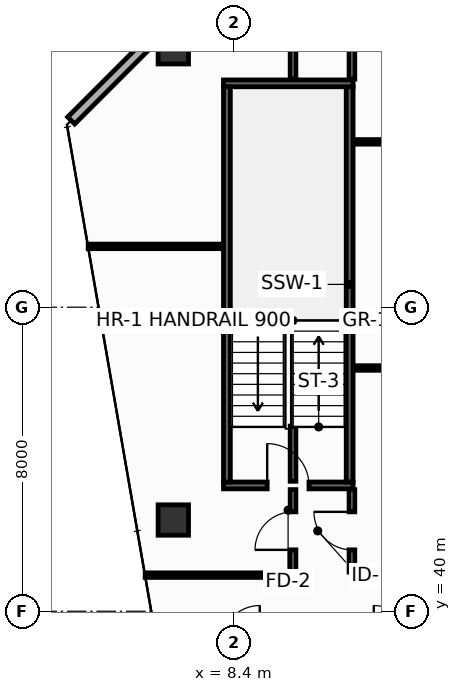
"""IFC4 building model, lengths in metres.
Left out: names, types, materials, properties, quantities, classifications, styles, units other than length and angle.
Written with IfcOpenShell. Run it as: python <this file> out.ifc"""

import sys

from ifc_helpers import new_model, si_unit, direction, frame, frame_2d, origin, origin_2d, place, context, subcontext, project, spatial, rectangle, hollow_rectangle, extrude, element, fill, save


model = new_model("IFC4")
c1 = context("Model", 3, precision=1e-05, world=origin(), true_north=direction((0.0, 1.0)))
c2 = subcontext(c1, "Body", "Model", "MODEL_VIEW")
j1 = project(units=[si_unit("LENGTHUNIT", "METRE"), si_unit("PLANEANGLEUNIT", "RADIAN")], contexts=[c1])
p1 = place(None, origin())
s1 = spatial("IfcSite", under=j1, at=p1, CompositionType="ELEMENT")
p2 = place(p1, origin())
s2 = spatial("IfcBuilding", under=s1, at=p2, CompositionType="ELEMENT")
p3 = place(p2, frame((0.0, 0.0, 238.2)))
s3 = spatial("IfcBuildingStorey", under=s2, at=p3, CompositionType="ELEMENT", Elevation=238.2)
for number, where, z_axis, x_axis in (
    (1, (6.8, 54.8, 0.0), (0.0, 0.0, 1.0), (1.0, 0.0, 0.0)),
    (2, (6.8, 42.4, 0.0), (0.0, 0.0, 1.0), (1.0, 0.0, 0.0)),
):
    element("IfcColumn", number, at=place(p3, frame(where, z_axis=z_axis, x_axis=x_axis)), inside=s3, PredefinedType="COLUMN", context=c2, shape_type="SweptSolid", body=[
        extrude(hollow_rectangle(XDim=0.8, YDim=0.8, WallThickness=0.036, at=origin_2d()), origin(), (0.0, 0.0, 1.0), 3.8),
    ])
p4 = place(p3, frame((8.12, 43.31, 0.0), z_axis=(0.0, 0.0, 1.0), x_axis=(1.0, 0.0, 0.0)))
e3 = element("IfcWall", 3, at=p4, inside=s3, PredefinedType="SHEAR", context=c2, shape_type="SweptSolid", body=[
    extrude(rectangle(XDim=3.41, YDim=0.18, at=frame_2d((1.705, 0.0))), origin(), (0.0, 0.0, 1.0), 3.55),
])
p5 = place(p4, frame((1.15, 0.0, 0.0)))
e4 = element("IfcOpeningElement", 4, at=p5, cuts=e3, PredefinedType="OPENING", context=c2, shape_type="SweptSolid", body=[
    extrude(rectangle(XDim=1.1, YDim=2.15, at=frame_2d((0.55, 1.075))), frame((0.0, 0.1, 0.0), z_axis=(0.0, -1.0, 0.0), x_axis=(1.0, 0.0, 0.0)), (0.0, 0.0, 1.0), 0.2),
])
p6 = place(p3, frame((11.44, 43.4, 0.0), z_axis=(0.0, 0.0, 1.0), x_axis=(0.0, 1.0, 0.0)))
e5 = element("IfcWall", 5, at=p6, inside=s3, PredefinedType="SHEAR", context=c2, shape_type="SweptSolid", body=[
    extrude(rectangle(XDim=10.4, YDim=0.18, at=frame_2d((5.2, 0.0))), origin(), (0.0, 0.0, 1.0), 3.55),
])
p7 = place(p3, frame((11.53, 53.89, 0.0), z_axis=(0.0, 0.0, 1.0), x_axis=(-1.0, 0.0, 0.0)))
e6 = element("IfcWall", 6, at=p7, inside=s3, PredefinedType="SHEAR", context=c2, shape_type="SweptSolid", body=[
    extrude(rectangle(XDim=3.41, YDim=0.18, at=frame_2d((1.705, 0.0))), origin(), (0.0, 0.0, 1.0), 3.55),
])
p8 = place(p3, frame((8.21, 53.8, 0.0), z_axis=(0.0, 0.0, 1.0), x_axis=(0.0, -1.0, 0.0)))
e7 = element("IfcWall", 7, at=p8, inside=s3, PredefinedType="SHEAR", context=c2, shape_type="SweptSolid", body=[
    extrude(rectangle(XDim=10.4, YDim=0.18, at=frame_2d((5.2, 0.0))), origin(), (0.0, 0.0, 1.0), 3.55),
])
p9 = place(p3, frame((7.087, 55.887, 0.0), z_axis=(0.0, 0.0, 1.0), x_axis=(-0.707106781187, -0.707106781187, 0.0)))
e8 = element("IfcWall", 8, at=p9, inside=s3, PredefinedType="STANDARD", context=c2, shape_type="SweptSolid", body=[
    extrude(rectangle(XDim=4.206, YDim=0.26, at=frame_2d((2.103, 0.0))), origin(), (0.0, 0.0, 1.0), 3.55),
])
p10 = place(p3, frame((6.059, 40.95, 0.0), z_axis=(0.0, 0.0, 1.0), x_axis=(1.0, 0.0, 0.0)))
e9 = element("IfcWall", 9, at=p10, inside=s3, PredefinedType="PARTITIONING", context=c2, shape_type="SweptSolid", body=[
    extrude(rectangle(XDim=3.891, YDim=0.12, at=frame_2d((1.945, 0.0))), origin(), (0.0, 0.0, 1.0), 3.085),
])
p11 = place(p3, frame((11.5, 40.95, 0.0), z_axis=(0.0, 0.0, 1.0), x_axis=(1.0, 0.0, 0.0)))
e10 = element("IfcWall", 10, at=p11, inside=s3, PredefinedType="PARTITIONING", context=c2, shape_type="SweptSolid", body=[
    extrude(rectangle(XDim=2.35, YDim=0.12, at=frame_2d((1.175, 0.0))), origin(), (0.0, 0.0, 1.0), 3.55),
])
p12 = place(p3, frame((11.55, 52.35, 0.0), z_axis=(0.0, 0.0, 1.0), x_axis=(1.0, 0.0, 0.0)))
e11 = element("IfcWall", 11, at=p12, inside=s3, PredefinedType="PARTITIONING", context=c2, shape_type="SweptSolid", body=[
    extrude(rectangle(XDim=2.13, YDim=0.12, at=frame_2d((1.065, 0.0))), origin(), (0.0, 0.0, 1.0), 3.55),
])
p13 = place(p3, frame((11.5, 54.0, 0.0), z_axis=(0.0, 0.0, 1.0), x_axis=(0.0, 1.0, 0.0)))
e12 = element("IfcWall", 12, at=p13, inside=s3, PredefinedType="PARTITIONING", context=c2, shape_type="SweptSolid", body=[
    extrude(rectangle(XDim=1.995, YDim=0.15, at=frame_2d((0.998, 0.0))), origin(), (0.0, 0.0, 1.0), 2.935),
])
p14 = place(p3, frame((4.56, 49.6, 0.0), z_axis=(0.0, 0.0, 1.0), x_axis=(1.0, 0.0, 0.0)))
e13 = element("IfcWall", 13, at=p14, inside=s3, PredefinedType="PARTITIONING", context=c2, shape_type="SweptSolid", body=[
    extrude(rectangle(XDim=3.54, YDim=0.12, at=frame_2d((1.77, 0.0))), origin(), (0.0, 0.0, 1.0), 2.947),
])
p15 = place(p3, frame((9.95, 41.03, 0.0), z_axis=(0.0, 0.0, 1.0), x_axis=(0.0, 1.0, 0.0)))
e14 = element("IfcWall", 14, at=p15, inside=s3, PredefinedType="PARTITIONING", context=c2, shape_type="SweptSolid", body=[
    extrude(rectangle(XDim=2.17, YDim=0.15, at=frame_2d((1.085, 0.0))), origin(), (0.0, 0.0, 1.0), 2.947),
])
p16 = place(p15, frame((0.585, 0.0, 0.0)))
e15 = element("IfcOpeningElement", 15, at=p16, cuts=e14, PredefinedType="OPENING", context=c2, shape_type="SweptSolid", body=[
    extrude(rectangle(XDim=1.0, YDim=2.15, at=frame_2d((0.5, 1.075))), frame((0.0, 0.085, 0.0), z_axis=(0.0, -1.0, 0.0), x_axis=(1.0, 0.0, 0.0)), (0.0, 0.0, 1.0), 0.17),
])
p17 = place(p3, frame((9.95, 43.42, 0.0), z_axis=(0.0, 0.0, 1.0), x_axis=(0.0, 1.0, 0.0)))
e16 = element("IfcWall", 16, at=p17, inside=s3, PredefinedType="PARTITIONING", context=c2, shape_type="SweptSolid", body=[
    extrude(rectangle(XDim=1.45, YDim=0.15, at=frame_2d((0.725, 0.0))), origin(), (0.0, 0.0, 1.0), 3.55),
])
p18 = place(p3, frame((9.95, 54.0, 0.0), z_axis=(0.0, 0.0, 1.0), x_axis=(0.0, 1.0, 0.0)))
e17 = element("IfcWall", 17, at=p18, inside=s3, PredefinedType="PARTITIONING", context=c2, shape_type="SweptSolid", body=[
    extrude(rectangle(XDim=1.995, YDim=0.15, at=frame_2d((0.998, 0.0))), origin(), (0.0, 0.0, 1.0), 2.935),
])
p19 = place(p3, frame((11.55, 46.4, 0.0), z_axis=(0.0, 0.0, 1.0), x_axis=(1.0, 0.0, 0.0)))
e18 = element("IfcWall", 18, at=p19, inside=s3, PredefinedType="PARTITIONING", context=c2, shape_type="SweptSolid", body=[
    extrude(rectangle(XDim=2.13, YDim=0.12, at=frame_2d((1.065, 0.0))), origin(), (0.0, 0.0, 1.0), 3.55),
])
p20 = place(p3, frame((11.5, 41.03, 0.0), z_axis=(0.0, 0.0, 1.0), x_axis=(0.0, 1.0, 0.0)))
e19 = element("IfcWall", 19, at=p20, inside=s3, PredefinedType="PARTITIONING", context=c2, shape_type="SweptSolid", body=[
    extrude(rectangle(XDim=2.17, YDim=0.15, at=frame_2d((1.085, 0.0))), origin(), (0.0, 0.0, 1.0), 2.947),
])
p21 = place(p20, frame((0.585, 0.0, 0.0)))
e20 = element("IfcOpeningElement", 20, at=p21, cuts=e19, PredefinedType="OPENING", context=c2, shape_type="SweptSolid", body=[
    extrude(rectangle(XDim=1.0, YDim=2.15, at=frame_2d((0.5, 1.075))), frame((0.0, 0.085, 0.0), z_axis=(0.0, -1.0, 0.0), x_axis=(1.0, 0.0, 0.0)), (0.0, 0.0, 1.0), 0.17),
])
p22 = place(p5, origin())
e21 = element("IfcDoor", 21, at=p22, inside=s3, OperationType="SINGLE_SWING_LEFT", PredefinedType="DOOR", context=c2, shape_type="SweptSolid", body=[
    extrude(rectangle(XDim=1.1, YDim=2.15, at=frame_2d((0.55, 1.075))), frame((0.0, 0.025, 0.0), z_axis=(0.0, -1.0, 0.0), x_axis=(1.0, 0.0, 0.0)), (0.0, 0.0, 1.0), 0.05),
])
fill(e4, e21)
p23 = place(p16, origin())
e22 = element("IfcDoor", 22, at=p23, inside=s3, OperationType="SINGLE_SWING_LEFT", PredefinedType="DOOR", context=c2, shape_type="SweptSolid", body=[
    extrude(rectangle(XDim=1.0, YDim=2.15, at=frame_2d((0.5, 1.075))), frame((0.0, 0.025, 0.0), z_axis=(0.0, -1.0, 0.0), x_axis=(1.0, 0.0, 0.0)), (0.0, 0.0, 1.0), 0.05),
])
fill(e15, e22)
p24 = place(p21, origin())
e23 = element("IfcDoor", 23, at=p24, inside=s3, OperationType="SINGLE_SWING_RIGHT", PredefinedType="DOOR", context=c2, shape_type="SweptSolid", body=[
    extrude(rectangle(XDim=1.0, YDim=2.15, at=frame_2d((0.5, 1.075))), frame((0.0, 0.025, 0.0), z_axis=(0.0, -1.0, 0.0), x_axis=(1.0, 0.0, 0.0)), (0.0, 0.0, 1.0), 0.05),
])
fill(e20, e23)
save(model, sys.argv[1])
